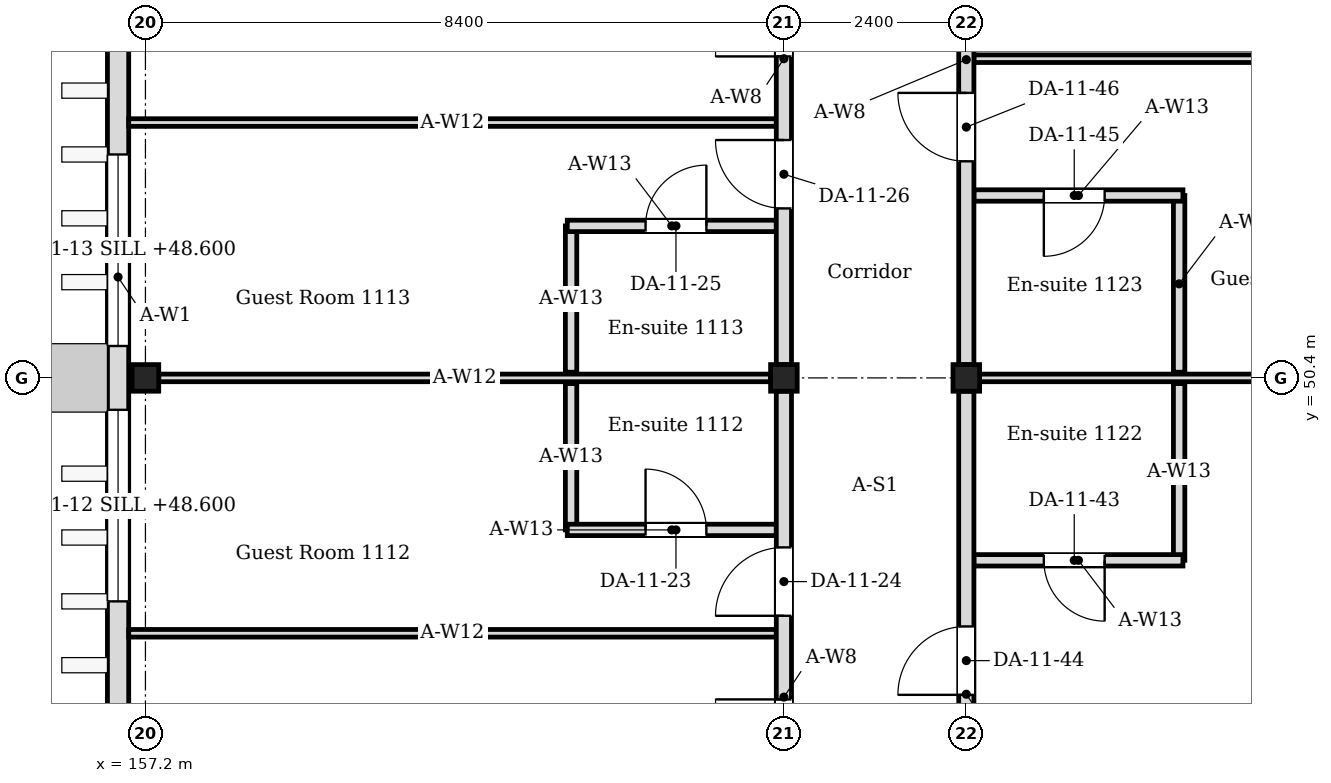
"""IFC4 building model, lengths in metres.
Left out: names, types, materials, properties, quantities, classifications, styles, units other than length and angle.
Written with IfcOpenShell. Run it as: python <this file> out.ifc"""

import sys

from ifc_helpers import new_model, si_unit, direction, frame, frame_2d, origin, origin_2d, place, context, subcontext, project, spatial, rectangle, i_section, extrude, element, fill, save


model = new_model("IFC4")
c1 = context("Model", 3, precision=1e-05, world=origin(), true_north=direction((0.0, 1.0)))
c2 = subcontext(c1, "Body", "Model", "MODEL_VIEW")
j1 = project(units=[si_unit("LENGTHUNIT", "METRE"), si_unit("PLANEANGLEUNIT", "RADIAN")], contexts=[c1])
p1 = place(None, origin())
s1 = spatial("IfcSite", under=j1, at=p1, CompositionType="ELEMENT")
p2 = place(p1, origin())
s2 = spatial("IfcBuilding", under=s1, at=p2, CompositionType="ELEMENT")
p3 = place(p2, frame((0.0, 0.0, 48.0)))
s3 = spatial("IfcBuildingStorey", under=s2, at=p3, CompositionType="ELEMENT", Elevation=48.0)
for number, where, z_axis, x_axis in (
    (1, (157.2, 50.4, 0.0), (0.0, 0.0, 1.0), (1.0, 0.0, 0.0)),
    (2, (165.6, 50.4, 0.0), (0.0, 0.0, 1.0), (1.0, 0.0, 0.0)),
    (3, (168.0, 50.4, 0.0), (0.0, 0.0, 1.0), (1.0, 0.0, 0.0)),
):
    element("IfcColumn", number, at=place(p3, frame(where, z_axis=z_axis, x_axis=x_axis)), inside=s3, PredefinedType="COLUMN", context=c2, shape_type="SweptSolid", body=[
        extrude(i_section(OverallWidth=0.35, OverallDepth=0.35, WebThickness=0.012, FlangeThickness=0.019, FilletRadius=0.013, at=origin_2d()), origin(), (0.0, 0.0, 1.0), 4.2),
    ])
p4 = place(p3, frame((156.84, 41.65, 0.0), z_axis=(0.0, 0.0, 1.0), x_axis=(0.0, 1.0, 0.0)))
e4 = element("IfcWall", 4, at=p4, inside=s3, PredefinedType="SOLIDWALL", context=c2, shape_type="SweptSolid", body=[
    extrude(rectangle(XDim=25.77, YDim=0.28, at=frame_2d((12.885, 0.0))), origin(), (0.0, 0.0, 1.0), 4.05),
])
p5 = place(p4, frame((1.61, 0.0, 0.6)))
e5 = element("IfcOpeningElement", 5, at=p5, cuts=e4, PredefinedType="OPENING", context=c2, shape_type="SweptSolid", body=[
    extrude(rectangle(XDim=2.52, YDim=2.4, at=frame_2d((1.26, 1.2))), frame((0.0, 0.15, 0.0), z_axis=(0.0, -1.0, 0.0), x_axis=(1.0, 0.0, 0.0)), (0.0, 0.0, 1.0), 0.3),
])
p6 = place(p4, frame((5.81, 0.0, 0.6)))
e6 = element("IfcOpeningElement", 6, at=p6, cuts=e4, PredefinedType="OPENING", context=c2, shape_type="SweptSolid", body=[
    extrude(rectangle(XDim=2.52, YDim=2.4, at=frame_2d((1.26, 1.2))), frame((0.0, 0.15, 0.0), z_axis=(0.0, -1.0, 0.0), x_axis=(1.0, 0.0, 0.0)), (0.0, 0.0, 1.0), 0.3),
])
p7 = place(p4, frame((9.17, 0.0, 0.6)))
e7 = element("IfcOpeningElement", 7, at=p7, cuts=e4, PredefinedType="OPENING", context=c2, shape_type="SweptSolid", body=[
    extrude(rectangle(XDim=2.52, YDim=2.4, at=frame_2d((1.26, 1.2))), frame((0.0, 0.15, 0.0), z_axis=(0.0, -1.0, 0.0), x_axis=(1.0, 0.0, 0.0)), (0.0, 0.0, 1.0), 0.3),
])
p8 = place(p4, frame((13.37, 0.0, 0.6)))
e8 = element("IfcOpeningElement", 8, at=p8, cuts=e4, PredefinedType="OPENING", context=c2, shape_type="SweptSolid", body=[
    extrude(rectangle(XDim=2.52, YDim=2.4, at=frame_2d((1.26, 1.2))), frame((0.0, 0.15, 0.0), z_axis=(0.0, -1.0, 0.0), x_axis=(1.0, 0.0, 0.0)), (0.0, 0.0, 1.0), 0.3),
])
p9 = place(p4, frame((18.41, 0.0, 0.6)))
e9 = element("IfcOpeningElement", 9, at=p9, cuts=e4, PredefinedType="OPENING", context=c2, shape_type="SweptSolid", body=[
    extrude(rectangle(XDim=2.52, YDim=2.4, at=frame_2d((1.26, 1.2))), frame((0.0, 0.15, 0.0), z_axis=(0.0, -1.0, 0.0), x_axis=(1.0, 0.0, 0.0)), (0.0, 0.0, 1.0), 0.3),
])
p10 = place(p4, frame((22.61, 0.0, 0.6)))
e10 = element("IfcOpeningElement", 10, at=p10, cuts=e4, PredefinedType="OPENING", context=c2, shape_type="SweptSolid", body=[
    extrude(rectangle(XDim=2.52, YDim=2.4, at=frame_2d((1.26, 1.2))), frame((0.0, 0.15, 0.0), z_axis=(0.0, -1.0, 0.0), x_axis=(1.0, 0.0, 0.0)), (0.0, 0.0, 1.0), 0.3),
])
p11 = place(p3, frame((162.8, 48.4, 0.0), z_axis=(0.0, 0.0, 1.0), x_axis=(0.0, 1.0, 0.0)))
e11 = element("IfcWall", 11, at=p11, inside=s3, PredefinedType="PARTITIONING", context=c2, shape_type="SweptSolid", body=[
    extrude(rectangle(XDim=1.925, YDim=0.15, at=frame_2d((0.962, 0.0))), origin(), (0.0, 0.0, 1.0), 4.05),
])
p12 = place(p3, frame((162.75, 48.4, 0.0), z_axis=(0.0, 0.0, 1.0), x_axis=(1.0, 0.0, 0.0)))
e12 = element("IfcWall", 12, at=p12, inside=s3, PredefinedType="PARTITIONING", context=c2, shape_type="SweptSolid", body=[
    extrude(rectangle(XDim=2.75, YDim=0.15, at=frame_2d((1.375, 0.0))), origin(), (0.0, 0.0, 1.0), 4.05),
])
p13 = place(p12, frame((1.03, 0.0, 0.0)))
e13 = element("IfcOpeningElement", 13, at=p13, cuts=e12, PredefinedType="OPENING", context=c2, shape_type="SweptSolid", body=[
    extrude(rectangle(XDim=0.8, YDim=2.1, at=frame_2d((0.4, 1.05))), frame((0.0, 0.085, 0.0), z_axis=(0.0, -1.0, 0.0), x_axis=(1.0, 0.0, 0.0)), (0.0, 0.0, 1.0), 0.17),
])
p14 = place(p3, frame((162.8, 50.475, 0.0), z_axis=(0.0, 0.0, 1.0), x_axis=(0.0, 1.0, 0.0)))
e14 = element("IfcWall", 14, at=p14, inside=s3, PredefinedType="PARTITIONING", context=c2, shape_type="SweptSolid", body=[
    extrude(rectangle(XDim=1.925, YDim=0.15, at=frame_2d((0.962, 0.0))), origin(), (0.0, 0.0, 1.0), 4.05),
])
p15 = place(p3, frame((162.75, 52.4, 0.0), z_axis=(0.0, 0.0, 1.0), x_axis=(1.0, 0.0, 0.0)))
e15 = element("IfcWall", 15, at=p15, inside=s3, PredefinedType="PARTITIONING", context=c2, shape_type="SweptSolid", body=[
    extrude(rectangle(XDim=2.75, YDim=0.15, at=frame_2d((1.375, 0.0))), origin(), (0.0, 0.0, 1.0), 4.05),
])
p16 = place(p15, frame((1.03, 0.0, 0.0)))
e16 = element("IfcOpeningElement", 16, at=p16, cuts=e15, PredefinedType="OPENING", context=c2, shape_type="SweptSolid", body=[
    extrude(rectangle(XDim=0.8, YDim=2.1, at=frame_2d((0.4, 1.05))), frame((0.0, 0.085, 0.0), z_axis=(0.0, -1.0, 0.0), x_axis=(1.0, 0.0, 0.0)), (0.0, 0.0, 1.0), 0.17),
])
p17 = place(p3, frame((170.8, 48.0, 0.0), z_axis=(0.0, 0.0, 1.0), x_axis=(0.0, 1.0, 0.0)))
e17 = element("IfcWall", 17, at=p17, inside=s3, PredefinedType="PARTITIONING", context=c2, shape_type="SweptSolid", body=[
    extrude(rectangle(XDim=2.325, YDim=0.15, at=frame_2d((1.163, 0.0))), origin(), (0.0, 0.0, 1.0), 4.05),
])
p18 = place(p3, frame((170.85, 48.0, 0.0), z_axis=(0.0, 0.0, 1.0), x_axis=(-1.0, 0.0, 0.0)))
e18 = element("IfcWall", 18, at=p18, inside=s3, PredefinedType="PARTITIONING", context=c2, shape_type="SweptSolid", body=[
    extrude(rectangle(XDim=2.75, YDim=0.15, at=frame_2d((1.375, 0.0))), origin(), (0.0, 0.0, 1.0), 4.05),
])
p19 = place(p18, frame((1.03, 0.0, 0.0)))
e19 = element("IfcOpeningElement", 19, at=p19, cuts=e18, PredefinedType="OPENING", context=c2, shape_type="SweptSolid", body=[
    extrude(rectangle(XDim=0.8, YDim=2.1, at=frame_2d((0.4, 1.05))), frame((0.0, 0.085, 0.0), z_axis=(0.0, -1.0, 0.0), x_axis=(1.0, 0.0, 0.0)), (0.0, 0.0, 1.0), 0.17),
])
p20 = place(p3, frame((170.8, 50.475, 0.0), z_axis=(0.0, 0.0, 1.0), x_axis=(0.0, 1.0, 0.0)))
e20 = element("IfcWall", 20, at=p20, inside=s3, PredefinedType="PARTITIONING", context=c2, shape_type="SweptSolid", body=[
    extrude(rectangle(XDim=2.325, YDim=0.15, at=frame_2d((1.163, 0.0))), origin(), (0.0, 0.0, 1.0), 4.05),
])
p21 = place(p3, frame((170.85, 52.8, 0.0), z_axis=(0.0, 0.0, 1.0), x_axis=(-1.0, 0.0, 0.0)))
e21 = element("IfcWall", 21, at=p21, inside=s3, PredefinedType="PARTITIONING", context=c2, shape_type="SweptSolid", body=[
    extrude(rectangle(XDim=2.75, YDim=0.15, at=frame_2d((1.375, 0.0))), origin(), (0.0, 0.0, 1.0), 4.05),
])
p22 = place(p21, frame((1.03, 0.0, 0.0)))
e22 = element("IfcOpeningElement", 22, at=p22, cuts=e21, PredefinedType="OPENING", context=c2, shape_type="SweptSolid", body=[
    extrude(rectangle(XDim=0.8, YDim=2.1, at=frame_2d((0.4, 1.05))), frame((0.0, 0.085, 0.0), z_axis=(0.0, -1.0, 0.0), x_axis=(1.0, 0.0, 0.0)), (0.0, 0.0, 1.0), 0.17),
])
for number, where, z_axis, x_axis in (
    (23, (157.375, 50.4, 0.0), (0.0, 0.0, 1.0), (1.0, 0.0, 0.0)),
    (24, (168.175, 50.4, 0.0), (0.0, 0.0, 1.0), (1.0, 0.0, 0.0)),
):
    element("IfcWall", number, at=place(p3, frame(where, z_axis=z_axis, x_axis=x_axis)), inside=s3, PredefinedType="PARTITIONING", context=c2, shape_type="SweptSolid", body=[
        extrude(rectangle(XDim=8.05, YDim=0.1, at=frame_2d((4.025, 0.0))), origin(), (0.0, 0.0, 1.0), 3.604),
    ])
for number, where, z_axis, x_axis in (
    (25, (156.98, 47.04, 0.0), (0.0, 0.0, 1.0), (1.0, 0.0, 0.0)),
    (26, (156.98, 53.76, 0.0), (0.0, 0.0, 1.0), (1.0, 0.0, 0.0)),
    (27, (168.1, 54.6, 0.0), (0.0, 0.0, 1.0), (1.0, 0.0, 0.0)),
):
    element("IfcWall", number, at=place(p3, frame(where, z_axis=z_axis, x_axis=x_axis)), inside=s3, PredefinedType="PARTITIONING", context=c2, shape_type="SweptSolid", body=[
        extrude(rectangle(XDim=8.52, YDim=0.1, at=frame_2d((4.26, 0.0))), origin(), (0.0, 0.0, 1.0), 3.604),
    ])
p23 = place(p3, frame((165.6, 42.175, 0.0), z_axis=(0.0, 0.0, 1.0), x_axis=(0.0, 1.0, 0.0)))
e28 = element("IfcWall", 28, at=p23, inside=s3, PredefinedType="PARTITIONING", context=c2, shape_type="SweptSolid", body=[
    extrude(rectangle(XDim=8.05, YDim=0.2, at=frame_2d((4.025, 0.0))), origin(), (0.0, 0.0, 1.0), 3.45),
])
p24 = place(p23, frame((3.095, 0.0, 0.0)))
e29 = element("IfcOpeningElement", 29, at=p24, cuts=e28, PredefinedType="OPENING", context=c2, shape_type="SweptSolid", body=[
    extrude(rectangle(XDim=0.9, YDim=2.1, at=frame_2d((0.45, 1.05))), frame((0.0, 0.11, 0.0), z_axis=(0.0, -1.0, 0.0), x_axis=(1.0, 0.0, 0.0)), (0.0, 0.0, 1.0), 0.22),
])
p25 = place(p23, frame((5.095, 0.0, 0.0)))
e30 = element("IfcOpeningElement", 30, at=p25, cuts=e28, PredefinedType="OPENING", context=c2, shape_type="SweptSolid", body=[
    extrude(rectangle(XDim=0.9, YDim=2.1, at=frame_2d((0.45, 1.05))), frame((0.0, 0.11, 0.0), z_axis=(0.0, -1.0, 0.0), x_axis=(1.0, 0.0, 0.0)), (0.0, 0.0, 1.0), 0.22),
])
p26 = place(p3, frame((165.6, 50.575, 0.0), z_axis=(0.0, 0.0, 1.0), x_axis=(0.0, 1.0, 0.0)))
e31 = element("IfcWall", 31, at=p26, inside=s3, PredefinedType="PARTITIONING", context=c2, shape_type="SweptSolid", body=[
    extrude(rectangle(XDim=8.05, YDim=0.2, at=frame_2d((4.025, 0.0))), origin(), (0.0, 0.0, 1.0), 3.45),
])
p27 = place(p26, frame((2.055, 0.0, 0.0)))
e32 = element("IfcOpeningElement", 32, at=p27, cuts=e31, PredefinedType="OPENING", context=c2, shape_type="SweptSolid", body=[
    extrude(rectangle(XDim=0.9, YDim=2.1, at=frame_2d((0.45, 1.05))), frame((0.0, 0.11, 0.0), z_axis=(0.0, -1.0, 0.0), x_axis=(1.0, 0.0, 0.0)), (0.0, 0.0, 1.0), 0.22),
])
p28 = place(p26, frame((4.055, 0.0, 0.0)))
e33 = element("IfcOpeningElement", 33, at=p28, cuts=e31, PredefinedType="OPENING", context=c2, shape_type="SweptSolid", body=[
    extrude(rectangle(XDim=0.9, YDim=2.1, at=frame_2d((0.45, 1.05))), frame((0.0, 0.11, 0.0), z_axis=(0.0, -1.0, 0.0), x_axis=(1.0, 0.0, 0.0)), (0.0, 0.0, 1.0), 0.22),
])
p29 = place(p3, frame((168.0, 42.25, 0.0), z_axis=(0.0, 0.0, 1.0), x_axis=(0.0, 1.0, 0.0)))
e34 = element("IfcWall", 34, at=p29, inside=s3, PredefinedType="PARTITIONING", context=c2, shape_type="SweptSolid", body=[
    extrude(rectangle(XDim=7.975, YDim=0.2, at=frame_2d((3.988, 0.0))), origin(), (0.0, 0.0, 1.0), 3.45),
])
p30 = place(p29, frame((1.98, 0.0, 0.0)))
e35 = element("IfcOpeningElement", 35, at=p30, cuts=e34, PredefinedType="OPENING", context=c2, shape_type="SweptSolid", body=[
    extrude(rectangle(XDim=0.9, YDim=2.1, at=frame_2d((0.45, 1.05))), frame((0.0, 0.11, 0.0), z_axis=(0.0, -1.0, 0.0), x_axis=(1.0, 0.0, 0.0)), (0.0, 0.0, 1.0), 0.22),
])
p31 = place(p29, frame((3.98, 0.0, 0.0)))
e36 = element("IfcOpeningElement", 36, at=p31, cuts=e34, PredefinedType="OPENING", context=c2, shape_type="SweptSolid", body=[
    extrude(rectangle(XDim=0.9, YDim=2.1, at=frame_2d((0.45, 1.05))), frame((0.0, 0.11, 0.0), z_axis=(0.0, -1.0, 0.0), x_axis=(1.0, 0.0, 0.0)), (0.0, 0.0, 1.0), 0.22),
])
p32 = place(p3, frame((168.0, 50.575, 0.0), z_axis=(0.0, 0.0, 1.0), x_axis=(0.0, 1.0, 0.0)))
e37 = element("IfcWall", 37, at=p32, inside=s3, PredefinedType="PARTITIONING", context=c2, shape_type="SweptSolid", body=[
    extrude(rectangle(XDim=8.025, YDim=0.2, at=frame_2d((4.013, 0.0))), origin(), (0.0, 0.0, 1.0), 3.45),
])
p33 = place(p32, frame((2.675, 0.0, 0.0)))
e38 = element("IfcOpeningElement", 38, at=p33, cuts=e37, PredefinedType="OPENING", context=c2, shape_type="SweptSolid", body=[
    extrude(rectangle(XDim=0.9, YDim=2.1, at=frame_2d((0.45, 1.05))), frame((0.0, 0.11, 0.0), z_axis=(0.0, -1.0, 0.0), x_axis=(1.0, 0.0, 0.0)), (0.0, 0.0, 1.0), 0.22),
])
p34 = place(p32, frame((4.475, 0.0, 0.0)))
e39 = element("IfcOpeningElement", 39, at=p34, cuts=e37, PredefinedType="OPENING", context=c2, shape_type="SweptSolid", body=[
    extrude(rectangle(XDim=0.9, YDim=2.1, at=frame_2d((0.45, 1.05))), frame((0.0, 0.11, 0.0), z_axis=(0.0, -1.0, 0.0), x_axis=(1.0, 0.0, 0.0)), (0.0, 0.0, 1.0), 0.22),
])
p35 = place(p6, origin())
e40 = element("IfcWindow", 40, at=p35, inside=s3, PartitioningType="SINGLE_PANEL", PredefinedType="WINDOW", context=c2, shape_type="SweptSolid", body=[
    extrude(rectangle(XDim=2.52, YDim=2.4, at=frame_2d((1.26, 1.2))), frame((0.0, 0.03, 0.0), z_axis=(0.0, -1.0, 0.0), x_axis=(1.0, 0.0, 0.0)), (0.0, 0.0, 1.0), 0.06),
])
fill(e6, e40)
p36 = place(p7, origin())
e41 = element("IfcWindow", 41, at=p36, inside=s3, PartitioningType="SINGLE_PANEL", PredefinedType="WINDOW", context=c2, shape_type="SweptSolid", body=[
    extrude(rectangle(XDim=2.52, YDim=2.4, at=frame_2d((1.26, 1.2))), frame((0.0, 0.03, 0.0), z_axis=(0.0, -1.0, 0.0), x_axis=(1.0, 0.0, 0.0)), (0.0, 0.0, 1.0), 0.06),
])
fill(e7, e41)
p37 = place(p24, origin())
e42 = element("IfcDoor", 42, at=p37, inside=s3, OperationType="SINGLE_SWING_RIGHT", PredefinedType="DOOR", context=c2, shape_type="SweptSolid", body=[
    extrude(rectangle(XDim=0.9, YDim=2.1, at=frame_2d((0.45, 1.05))), frame((0.0, 0.025, 0.0), z_axis=(0.0, -1.0, 0.0), x_axis=(1.0, 0.0, 0.0)), (0.0, 0.0, 1.0), 0.05),
])
fill(e29, e42)
p38 = place(p13, origin())
e43 = element("IfcDoor", 43, at=p38, inside=s3, OperationType="SINGLE_SWING_LEFT", PredefinedType="DOOR", context=c2, shape_type="SweptSolid", body=[
    extrude(rectangle(XDim=0.8, YDim=2.1, at=frame_2d((0.4, 1.05))), frame((0.0, 0.025, 0.0), z_axis=(0.0, -1.0, 0.0), x_axis=(1.0, 0.0, 0.0)), (0.0, 0.0, 1.0), 0.05),
])
fill(e13, e43)
p39 = place(p25, origin())
e44 = element("IfcDoor", 44, at=p39, inside=s3, OperationType="SINGLE_SWING_LEFT", PredefinedType="DOOR", context=c2, shape_type="SweptSolid", body=[
    extrude(rectangle(XDim=0.9, YDim=2.1, at=frame_2d((0.45, 1.05))), frame((0.0, 0.025, 0.0), z_axis=(0.0, -1.0, 0.0), x_axis=(1.0, 0.0, 0.0)), (0.0, 0.0, 1.0), 0.05),
])
fill(e30, e44)
p40 = place(p16, origin())
e45 = element("IfcDoor", 45, at=p40, inside=s3, OperationType="SINGLE_SWING_RIGHT", PredefinedType="DOOR", context=c2, shape_type="SweptSolid", body=[
    extrude(rectangle(XDim=0.8, YDim=2.1, at=frame_2d((0.4, 1.05))), frame((0.0, 0.025, 0.0), z_axis=(0.0, -1.0, 0.0), x_axis=(1.0, 0.0, 0.0)), (0.0, 0.0, 1.0), 0.05),
])
fill(e16, e45)
p41 = place(p27, origin())
e46 = element("IfcDoor", 46, at=p41, inside=s3, OperationType="SINGLE_SWING_RIGHT", PredefinedType="DOOR", context=c2, shape_type="SweptSolid", body=[
    extrude(rectangle(XDim=0.9, YDim=2.1, at=frame_2d((0.45, 1.05))), frame((0.0, 0.025, 0.0), z_axis=(0.0, -1.0, 0.0), x_axis=(1.0, 0.0, 0.0)), (0.0, 0.0, 1.0), 0.05),
])
fill(e32, e46)
p42 = place(p28, origin())
e47 = element("IfcDoor", 47, at=p42, inside=s3, OperationType="SINGLE_SWING_LEFT", PredefinedType="DOOR", context=c2, shape_type="SweptSolid", body=[
    extrude(rectangle(XDim=0.9, YDim=2.1, at=frame_2d((0.45, 1.05))), frame((0.0, 0.025, 0.0), z_axis=(0.0, -1.0, 0.0), x_axis=(1.0, 0.0, 0.0)), (0.0, 0.0, 1.0), 0.05),
])
fill(e33, e47)
p43 = place(p19, origin())
e48 = element("IfcDoor", 48, at=p43, inside=s3, OperationType="SINGLE_SWING_LEFT", PredefinedType="DOOR", context=c2, shape_type="SweptSolid", body=[
    extrude(rectangle(XDim=0.8, YDim=2.1, at=frame_2d((0.4, 1.05))), frame((0.0, 0.025, 0.0), z_axis=(0.0, -1.0, 0.0), x_axis=(1.0, 0.0, 0.0)), (0.0, 0.0, 1.0), 0.05),
])
fill(e19, e48)
p44 = place(p31, origin())
e49 = element("IfcDoor", 49, at=p44, inside=s3, OperationType="SINGLE_SWING_LEFT", PredefinedType="DOOR", context=c2, shape_type="SweptSolid", body=[
    extrude(rectangle(XDim=0.9, YDim=2.1, at=frame_2d((0.45, 1.05))), frame((0.0, 0.025, 0.0), z_axis=(0.0, -1.0, 0.0), x_axis=(1.0, 0.0, 0.0)), (0.0, 0.0, 1.0), 0.05),
])
fill(e36, e49)
p45 = place(p22, origin())
e50 = element("IfcDoor", 50, at=p45, inside=s3, OperationType="SINGLE_SWING_RIGHT", PredefinedType="DOOR", context=c2, shape_type="SweptSolid", body=[
    extrude(rectangle(XDim=0.8, YDim=2.1, at=frame_2d((0.4, 1.05))), frame((0.0, 0.025, 0.0), z_axis=(0.0, -1.0, 0.0), x_axis=(1.0, 0.0, 0.0)), (0.0, 0.0, 1.0), 0.05),
])
fill(e22, e50)
p46 = place(p33, origin())
e51 = element("IfcDoor", 51, at=p46, inside=s3, OperationType="SINGLE_SWING_RIGHT", PredefinedType="DOOR", context=c2, shape_type="SweptSolid", body=[
    extrude(rectangle(XDim=0.9, YDim=2.1, at=frame_2d((0.45, 1.05))), frame((0.0, 0.025, 0.0), z_axis=(0.0, -1.0, 0.0), x_axis=(1.0, 0.0, 0.0)), (0.0, 0.0, 1.0), 0.05),
])
fill(e38, e51)
save(model, sys.argv[1])
